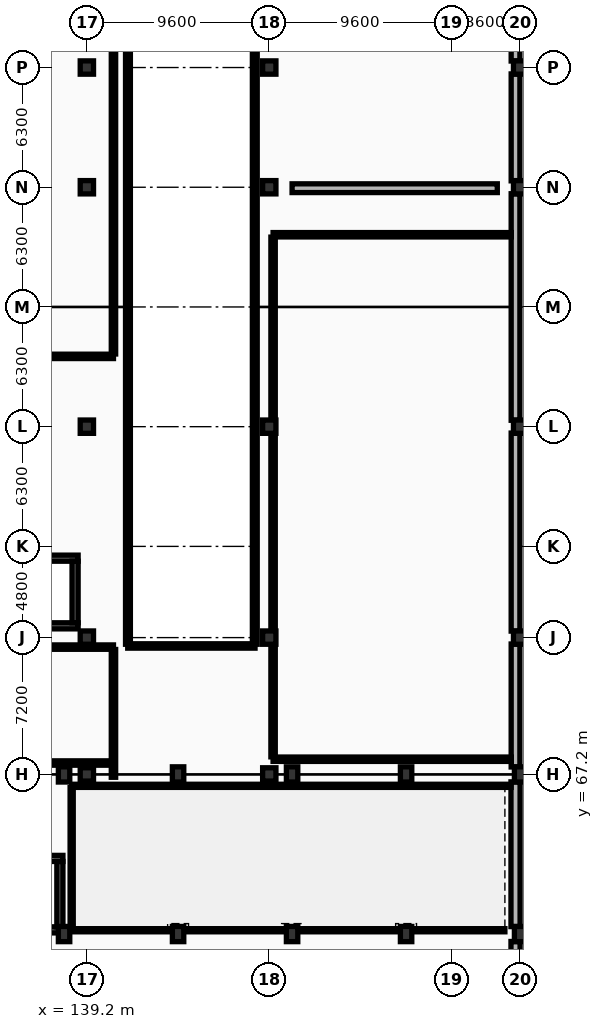
"""IFC4 building model, lengths in metres.
Left out: names, types, materials, properties, quantities, classifications, styles, units other than length and angle.
Written with IfcOpenShell. Run it as: python <this file> out.ifc"""

import sys

from ifc_helpers import new_model, si_unit, direction, frame, frame_2d, origin, origin_2d, place, context, subcontext, project, spatial, rectangle, extrude, element, fill, save


model = new_model("IFC4")
c1 = context("Model", 3, precision=1e-05, world=origin(), true_north=direction((0.0, 1.0)))
c2 = subcontext(c1, "Body", "Model", "MODEL_VIEW")
j1 = project(units=[si_unit("LENGTHUNIT", "METRE"), si_unit("PLANEANGLEUNIT", "RADIAN")], contexts=[c1])
p1 = place(None, origin())
s1 = spatial("IfcSite", under=j1, at=p1, CompositionType="ELEMENT")
p2 = place(p1, origin())
s2 = spatial("IfcBuilding", under=s1, at=p2, CompositionType="ELEMENT")
p3 = place(p2, origin())
s3 = spatial("IfcBuildingStorey", under=s2, at=p3, CompositionType="ELEMENT", Elevation=0.0)
for number, where, z_axis, x_axis in (
    (1, (138.0, 58.8, 0.0), (0.0, 0.0, 1.0), (1.0, 0.0, 0.0)),
    (2, (138.0, 67.2, 0.0), (0.0, 0.0, 1.0), (1.0, 0.0, 0.0)),
    (3, (144.0, 58.8, 0.0), (0.0, 0.0, 1.0), (1.0, 0.0, 0.0)),
    (4, (144.0, 67.2, 0.0), (0.0, 0.0, 1.0), (1.0, 0.0, 0.0)),
    (5, (150.0, 58.8, 0.0), (0.0, 0.0, 1.0), (1.0, 0.0, 0.0)),
    (6, (150.0, 67.2, 0.0), (0.0, 0.0, 1.0), (1.0, 0.0, 0.0)),
    (7, (156.0, 58.8, 0.0), (0.0, 0.0, 1.0), (1.0, 0.0, 0.0)),
    (8, (156.0, 67.2, 0.0), (0.0, 0.0, 1.0), (1.0, 0.0, 0.0)),
    (9, (162.0, 58.8, 0.0), (0.0, 0.0, 1.0), (1.0, 0.0, 0.0)),
    (10, (162.0, 67.2, 0.0), (0.0, 0.0, 1.0), (1.0, 0.0, 0.0)),
):
    element("IfcColumn", number, at=place(p3, frame(where, z_axis=z_axis, x_axis=x_axis)), inside=s3, PredefinedType="COLUMN", context=c2, shape_type="SweptSolid", body=[
        extrude(rectangle(XDim=0.6, YDim=0.8, at=origin_2d()), origin(), (0.0, 0.0, 1.0), 5.4),
    ])
for number, where, z_axis, x_axis in (
    (11, (139.2, 67.2, 0.0), (0.0, 0.0, 1.0), (1.0, 0.0, 0.0)),
    (12, (139.2, 74.4, 0.0), (0.0, 0.0, 1.0), (1.0, 0.0, 0.0)),
    (13, (139.2, 85.5, 0.0), (0.0, 0.0, 1.0), (1.0, 0.0, 0.0)),
    (14, (139.2, 98.1, 0.0), (0.0, 0.0, 1.0), (1.0, 0.0, 0.0)),
    (15, (139.2, 104.4, 0.0), (0.0, 0.0, 1.0), (1.0, 0.0, 0.0)),
    (16, (148.8, 67.2, 0.0), (0.0, 0.0, 1.0), (1.0, 0.0, 0.0)),
    (17, (148.8, 74.4, 0.0), (0.0, 0.0, 1.0), (1.0, 0.0, 0.0)),
    (18, (148.8, 85.5, 0.0), (0.0, 0.0, 1.0), (1.0, 0.0, 0.0)),
    (19, (148.8, 98.1, 0.0), (0.0, 0.0, 1.0), (1.0, 0.0, 0.0)),
    (20, (148.8, 104.4, 0.0), (0.0, 0.0, 1.0), (1.0, 0.0, 0.0)),
    (21, (162.0, 74.4, 0.0), (0.0, 0.0, 1.0), (1.0, 0.0, 0.0)),
    (22, (162.0, 85.5, 0.0), (0.0, 0.0, 1.0), (1.0, 0.0, 0.0)),
    (23, (162.0, 98.1, 0.0), (0.0, 0.0, 1.0), (1.0, 0.0, 0.0)),
    (24, (162.0, 104.4, 0.0), (0.0, 0.0, 1.0), (1.0, 0.0, 0.0)),
):
    element("IfcColumn", number, at=place(p3, frame(where, z_axis=z_axis, x_axis=x_axis)), inside=s3, PredefinedType="COLUMN", context=c2, shape_type="SweptSolid", body=[
        extrude(rectangle(XDim=0.7, YDim=0.7, at=origin_2d()), origin(), (0.0, 0.0, 1.0), 5.4),
    ])
p4 = place(p3, frame((161.76, 58.408, 0.0), z_axis=(0.0, 0.0, 1.0), x_axis=(0.0, -1.0, 0.0)))
e25 = element("IfcWall", 25, at=p4, inside=s3, PredefinedType="STANDARD", context=c2, shape_type="SweptSolid", body=[
    extrude(rectangle(XDim=20.816, YDim=0.48, at=frame_2d((10.408, 0.0))), origin(), (0.0, 0.0, 1.0), 4.17),
])
p5 = place(p4, frame((4.708, 0.0, 0.0)))
e26 = element("IfcOpeningElement", 26, at=p5, cuts=e25, PredefinedType="OPENING", context=c2, shape_type="SweptSolid", body=[
    extrude(rectangle(XDim=2.4, YDim=2.8, at=frame_2d((1.2, 1.4))), frame((0.0, 0.25, 0.0), z_axis=(0.0, -1.0, 0.0), x_axis=(1.0, 0.0, 0.0)), (0.0, 0.0, 1.0), 0.5),
])
p6 = place(p4, frame((10.308, 0.0, 0.0)))
e27 = element("IfcOpeningElement", 27, at=p6, cuts=e25, PredefinedType="OPENING", context=c2, shape_type="SweptSolid", body=[
    extrude(rectangle(XDim=2.4, YDim=2.8, at=frame_2d((1.2, 1.4))), frame((0.0, 0.25, 0.0), z_axis=(0.0, -1.0, 0.0), x_axis=(1.0, 0.0, 0.0)), (0.0, 0.0, 1.0), 0.5),
])
p7 = place(p4, frame((15.708, 0.0, 0.0)))
e28 = element("IfcOpeningElement", 28, at=p7, cuts=e25, PredefinedType="OPENING", context=c2, shape_type="SweptSolid", body=[
    extrude(rectangle(XDim=2.4, YDim=2.8, at=frame_2d((1.2, 1.4))), frame((0.0, 0.25, 0.0), z_axis=(0.0, -1.0, 0.0), x_axis=(1.0, 0.0, 0.0)), (0.0, 0.0, 1.0), 0.5),
])
p8 = place(p3, frame((161.76, 66.808, 0.0), z_axis=(0.0, 0.0, 1.0), x_axis=(0.0, -1.0, 0.0)))
e29 = element("IfcWall", 29, at=p8, inside=s3, PredefinedType="STANDARD", context=c2, shape_type="SweptSolid", body=[
    extrude(rectangle(XDim=7.616, YDim=0.48, at=frame_2d((3.808, 0.0))), origin(), (0.0, 0.0, 1.0), 4.17),
])
p9 = place(p8, frame((1.383, 0.0, 0.85)))
e30 = element("IfcOpeningElement", 30, at=p9, cuts=e29, PredefinedType="OPENING", context=c2, shape_type="SweptSolid", body=[
    extrude(rectangle(XDim=1.7, YDim=2.3, at=frame_2d((0.85, 1.15))), frame((0.0, 0.25, 0.0), z_axis=(0.0, -1.0, 0.0), x_axis=(1.0, 0.0, 0.0)), (0.0, 0.0, 1.0), 0.5),
])
p10 = place(p8, frame((4.533, 0.0, 0.85)))
e31 = element("IfcOpeningElement", 31, at=p10, cuts=e29, PredefinedType="OPENING", context=c2, shape_type="SweptSolid", body=[
    extrude(rectangle(XDim=1.7, YDim=2.3, at=frame_2d((0.85, 1.15))), frame((0.0, 0.25, 0.0), z_axis=(0.0, -1.0, 0.0), x_axis=(1.0, 0.0, 0.0)), (0.0, 0.0, 1.0), 0.5),
])
p11 = place(p3, frame((161.76, 74.063, 0.0), z_axis=(0.0, 0.0, 1.0), x_axis=(0.0, -1.0, 0.0)))
e32 = element("IfcWall", 32, at=p11, inside=s3, PredefinedType="STANDARD", context=c2, shape_type="SweptSolid", body=[
    extrude(rectangle(XDim=6.471, YDim=0.46, at=frame_2d((3.235, 0.0))), origin(), (0.0, 0.0, 1.0), 4.27),
])
p12 = place(p11, frame((1.553, 0.0, 2.15)))
e33 = element("IfcOpeningElement", 33, at=p12, cuts=e32, PredefinedType="OPENING", context=c2, shape_type="SweptSolid", body=[
    extrude(rectangle(XDim=0.85, YDim=0.9, at=frame_2d((0.425, 0.45))), frame((0.0, 0.24, 0.0), z_axis=(0.0, -1.0, 0.0), x_axis=(1.0, 0.0, 0.0)), (0.0, 0.0, 1.0), 0.48),
])
p13 = place(p11, frame((4.123, 0.0, 2.15)))
e34 = element("IfcOpeningElement", 34, at=p13, cuts=e32, PredefinedType="OPENING", context=c2, shape_type="SweptSolid", body=[
    extrude(rectangle(XDim=0.85, YDim=0.9, at=frame_2d((0.425, 0.45))), frame((0.0, 0.24, 0.0), z_axis=(0.0, -1.0, 0.0), x_axis=(1.0, 0.0, 0.0)), (0.0, 0.0, 1.0), 0.48),
])
p14 = place(p3, frame((161.76, 85.163, 0.0), z_axis=(0.0, 0.0, 1.0), x_axis=(0.0, -1.0, 0.0)))
e35 = element("IfcWall", 35, at=p14, inside=s3, PredefinedType="STANDARD", context=c2, shape_type="SweptSolid", body=[
    extrude(rectangle(XDim=10.421, YDim=0.46, at=frame_2d((5.21, 0.0))), origin(), (0.0, 0.0, 1.0), 4.27),
])
p15 = place(p14, frame((2.528, 0.0, 2.15)))
e36 = element("IfcOpeningElement", 36, at=p15, cuts=e35, PredefinedType="OPENING", context=c2, shape_type="SweptSolid", body=[
    extrude(rectangle(XDim=0.85, YDim=0.9, at=frame_2d((0.425, 0.45))), frame((0.0, 0.24, 0.0), z_axis=(0.0, -1.0, 0.0), x_axis=(1.0, 0.0, 0.0)), (0.0, 0.0, 1.0), 0.48),
])
p16 = place(p14, frame((7.048, 0.0, 2.15)))
e37 = element("IfcOpeningElement", 37, at=p16, cuts=e35, PredefinedType="OPENING", context=c2, shape_type="SweptSolid", body=[
    extrude(rectangle(XDim=0.85, YDim=0.9, at=frame_2d((0.425, 0.45))), frame((0.0, 0.24, 0.0), z_axis=(0.0, -1.0, 0.0), x_axis=(1.0, 0.0, 0.0)), (0.0, 0.0, 1.0), 0.48),
])
p17 = place(p3, frame((161.76, 97.758, 0.0), z_axis=(0.0, 0.0, 1.0), x_axis=(0.0, -1.0, 0.0)))
e38 = element("IfcWall", 38, at=p17, inside=s3, PredefinedType="STANDARD", context=c2, shape_type="SweptSolid", body=[
    extrude(rectangle(XDim=11.921, YDim=0.46, at=frame_2d((5.96, 0.0))), origin(), (0.0, 0.0, 1.0), 4.27),
])
p18 = place(p17, frame((9.558, 0.0, 0.0)))
e39 = element("IfcOpeningElement", 39, at=p18, cuts=e38, PredefinedType="OPENING", context=c2, shape_type="SweptSolid", body=[
    extrude(rectangle(XDim=1.8, YDim=2.25, at=frame_2d((0.9, 1.125))), frame((0.0, 0.24, 0.0), z_axis=(0.0, -1.0, 0.0), x_axis=(1.0, 0.0, 0.0)), (0.0, 0.0, 1.0), 0.48),
])
p19 = place(p3, frame((161.76, 104.063, 0.0), z_axis=(0.0, 0.0, 1.0), x_axis=(0.0, -1.0, 0.0)))
e40 = element("IfcWall", 40, at=p19, inside=s3, PredefinedType="STANDARD", context=c2, shape_type="SweptSolid", body=[
    extrude(rectangle(XDim=5.626, YDim=0.46, at=frame_2d((2.813, 0.0))), origin(), (0.0, 0.0, 1.0), 4.27),
])
p20 = place(p19, frame((0.713, 0.0, 0.0)))
e41 = element("IfcOpeningElement", 41, at=p20, cuts=e40, PredefinedType="OPENING", context=c2, shape_type="SweptSolid", body=[
    extrude(rectangle(XDim=4.2, YDim=3.6, at=frame_2d((2.1, 1.8))), frame((0.0, 0.24, 0.0), z_axis=(0.0, -1.0, 0.0), x_axis=(1.0, 0.0, 0.0)), (0.0, 0.0, 1.0), 0.48),
])
p21 = place(p3, frame((161.76, 112.32, 0.0), z_axis=(0.0, 0.0, 1.0), x_axis=(0.0, -1.0, 0.0)))
e42 = element("IfcWall", 42, at=p21, inside=s3, PredefinedType="STANDARD", context=c2, shape_type="SweptSolid", body=[
    extrude(rectangle(XDim=7.578, YDim=0.46, at=frame_2d((3.789, 0.0))), origin(), (0.0, 0.0, 1.0), 4.57),
])
p22 = place(p21, frame((1.71, 0.0, 2.15)))
e43 = element("IfcOpeningElement", 43, at=p22, cuts=e42, PredefinedType="OPENING", context=c2, shape_type="SweptSolid", body=[
    extrude(rectangle(XDim=0.85, YDim=0.9, at=frame_2d((0.425, 0.45))), frame((0.0, 0.24, 0.0), z_axis=(0.0, -1.0, 0.0), x_axis=(1.0, 0.0, 0.0)), (0.0, 0.0, 1.0), 0.48),
])
p23 = place(p21, frame((4.88, 0.0, 2.15)))
e44 = element("IfcOpeningElement", 44, at=p23, cuts=e42, PredefinedType="OPENING", context=c2, shape_type="SweptSolid", body=[
    extrude(rectangle(XDim=0.85, YDim=0.9, at=frame_2d((0.425, 0.45))), frame((0.0, 0.24, 0.0), z_axis=(0.0, -1.0, 0.0), x_axis=(1.0, 0.0, 0.0)), (0.0, 0.0, 1.0), 0.48),
])
p24 = place(p3, frame((150.0, 98.05, 0.0), z_axis=(0.0, 0.0, 1.0), x_axis=(1.0, 0.0, 0.0)))
e45 = element("IfcWall", 45, at=p24, inside=s3, PredefinedType="STANDARD", context=c2, shape_type="SweptSolid", body=[
    extrude(rectangle(XDim=10.8, YDim=0.46, at=frame_2d((5.4, 0.0))), origin(), (0.0, 0.0, 1.0), 4.1),
])
p25 = place(p24, frame((3.3, 0.0, 0.0)))
e46 = element("IfcOpeningElement", 46, at=p25, cuts=e45, PredefinedType="OPENING", context=c2, shape_type="SweptSolid", body=[
    extrude(rectangle(XDim=4.2, YDim=3.6, at=frame_2d((2.1, 1.8))), frame((0.0, 0.24, 0.0), z_axis=(0.0, -1.0, 0.0), x_axis=(1.0, 0.0, 0.0)), (0.0, 0.0, 1.0), 0.48),
])
for number, where, z_axis, x_axis in (
    (47, (129.86, 78.58, 0.0), (0.0, 0.0, 1.0), (1.0, 0.0, 0.0)),
    (48, (138.74, 75.02, 0.0), (0.0, 0.0, 1.0), (-1.0, 0.0, 0.0)),
):
    element("IfcWall", number, at=place(p3, frame(where, z_axis=z_axis, x_axis=x_axis)), inside=s3, PredefinedType="SHEAR", context=c2, shape_type="SweptSolid", body=[
        extrude(rectangle(XDim=8.88, YDim=0.32, at=frame_2d((4.44, 0.0))), origin(), (0.0, 0.0, 1.0), 5.14),
    ])
p26 = place(p3, frame((138.58, 78.42, 0.0), z_axis=(0.0, 0.0, 1.0), x_axis=(0.0, -1.0, 0.0)))
e49 = element("IfcWall", 49, at=p26, inside=s3, PredefinedType="SHEAR", context=c2, shape_type="SweptSolid", body=[
    extrude(rectangle(XDim=3.24, YDim=0.32, at=frame_2d((1.62, 0.0))), origin(), (0.0, 0.0, 1.0), 5.14),
])
for number, where, z_axis, x_axis in (
    (50, (128.66, 62.78, 0.0), (0.0, 0.0, 1.0), (1.0, 0.0, 0.0)),
    (51, (137.94, 59.02, 0.0), (0.0, 0.0, 1.0), (-1.0, 0.0, 0.0)),
):
    element("IfcWall", number, at=place(p3, frame(where, z_axis=z_axis, x_axis=x_axis)), inside=s3, PredefinedType="SHEAR", context=c2, shape_type="SweptSolid", body=[
        extrude(rectangle(XDim=9.28, YDim=0.32, at=frame_2d((4.64, 0.0))), origin(), (0.0, 0.0, 1.0), 5.14),
    ])
p27 = place(p3, frame((137.78, 62.62, 0.0), z_axis=(0.0, 0.0, 1.0), x_axis=(0.0, -1.0, 0.0)))
e52 = element("IfcWall", 52, at=p27, inside=s3, PredefinedType="SHEAR", context=c2, shape_type="SweptSolid", body=[
    extrude(rectangle(XDim=3.44, YDim=0.32, at=frame_2d((1.72, 0.0))), origin(), (0.0, 0.0, 1.0), 5.14),
])
for number, where, z_axis, x_axis in (
    (53, (141.35, 74.05, 0.0), (0.0, 0.0, 1.0), (0.0, 1.0, 0.0)),
    (54, (148.05, 112.2, 0.0), (0.0, 0.0, 1.0), (0.0, -1.0, 0.0)),
):
    element("IfcWall", number, at=place(p3, frame(where, z_axis=z_axis, x_axis=x_axis)), inside=s3, PredefinedType="STANDARD", context=c2, shape_type="SweptSolid", body=[
        extrude(rectangle(XDim=38.15, YDim=0.23, at=frame_2d((19.075, 0.0))), origin(), (0.0, 0.0, 1.0), 4.37),
    ])
p28 = place(p3, frame((148.05, 73.96, 0.0), z_axis=(0.0, 0.0, 1.0), x_axis=(-1.0, 0.0, 0.0)))
e55 = element("IfcWall", 55, at=p28, inside=s3, PredefinedType="STANDARD", context=c2, shape_type="SweptSolid", body=[
    extrude(rectangle(XDim=6.7, YDim=0.23, at=frame_2d((3.35, 0.0))), origin(), (0.0, 0.0, 1.0), 1.3),
])
p29 = place(p3, frame((138.4, 66.6, 0.0), z_axis=(0.0, 0.0, 1.0), x_axis=(1.0, 0.0, 0.0)))
e56 = element("IfcWall", 56, at=p29, inside=s3, PredefinedType="PARTITIONING", context=c2, shape_type="SweptSolid", body=[
    extrude(rectangle(XDim=23.126, YDim=0.165, at=frame_2d((11.563, 0.0))), origin(), (0.0, 0.0, 1.0), 4.62),
])
p30 = place(p3, frame((161.2, 59.0, 0.0), z_axis=(0.0, 0.0, 1.0), x_axis=(-1.0, 0.0, 0.0)))
e57 = element("IfcWall", 57, at=p30, inside=s3, PredefinedType="PARTITIONING", context=c2, shape_type="SweptSolid", body=[
    extrude(rectangle(XDim=22.8, YDim=0.165, at=frame_2d((11.4, 0.0))), origin(), (0.0, 0.0, 1.0), 4.17),
])
p31 = place(p30, frame((7.742, 0.0, 0.0)))
e58 = element("IfcOpeningElement", 58, at=p31, cuts=e57, PredefinedType="OPENING", context=c2, shape_type="SweptSolid", body=[
    extrude(rectangle(XDim=0.98, YDim=2.2, at=frame_2d((0.49, 1.1))), frame((0.0, 0.093, 0.0), z_axis=(0.0, -1.0, 0.0), x_axis=(1.0, 0.0, 0.0)), (0.0, 0.0, 1.0), 0.185),
])
p32 = place(p3, frame((138.4, 59.093, 0.0), z_axis=(0.0, 0.0, 1.0), x_axis=(0.0, 1.0, 0.0)))
e59 = element("IfcWall", 59, at=p32, inside=s3, PredefinedType="PARTITIONING", context=c2, shape_type="SweptSolid", body=[
    extrude(rectangle(XDim=7.415, YDim=0.165, at=frame_2d((3.708, 0.0))), origin(), (0.0, 0.0, 1.0), 4.17),
])
p33 = place(p3, frame((149.0, 95.6, 0.0), z_axis=(0.0, 0.0, 1.0), x_axis=(1.0, 0.0, 0.0)))
e60 = element("IfcWall", 60, at=p33, inside=s3, PredefinedType="STANDARD", context=c2, shape_type="SweptSolid", body=[
    extrude(rectangle(XDim=12.536, YDim=0.23, at=frame_2d((6.268, 0.0))), origin(), (0.0, 0.0, 1.0), 4.27),
])
p34 = place(p3, frame((161.536, 68.0, 0.0), z_axis=(0.0, 0.0, 1.0), x_axis=(-1.0, 0.0, 0.0)))
e61 = element("IfcWall", 61, at=p34, inside=s3, PredefinedType="STANDARD", context=c2, shape_type="SweptSolid", body=[
    extrude(rectangle(XDim=12.536, YDim=0.23, at=frame_2d((6.268, 0.0))), origin(), (0.0, 0.0, 1.0), 4.62),
])
p35 = place(p3, frame((149.0, 68.125, 0.0), z_axis=(0.0, 0.0, 1.0), x_axis=(0.0, 1.0, 0.0)))
e62 = element("IfcWall", 62, at=p35, inside=s3, PredefinedType="STANDARD", context=c2, shape_type="SweptSolid", body=[
    extrude(rectangle(XDim=27.35, YDim=0.23, at=frame_2d((13.675, 0.0))), origin(), (0.0, 0.0, 1.0), 4.27),
])
p36 = place(p35, frame((1.63, 0.0, 0.0)))
e63 = element("IfcOpeningElement", 63, at=p36, cuts=e62, PredefinedType="OPENING", context=c2, shape_type="SweptSolid", body=[
    extrude(rectangle(XDim=1.05, YDim=2.15, at=frame_2d((0.525, 1.075))), frame((0.0, 0.125, 0.0), z_axis=(0.0, -1.0, 0.0), x_axis=(1.0, 0.0, 0.0)), (0.0, 0.0, 1.0), 0.25),
])
p37 = place(p3, frame((120.6, 73.9, 0.0), z_axis=(0.0, 0.0, 1.0), x_axis=(1.0, 0.0, 0.0)))
e64 = element("IfcWall", 64, at=p37, inside=s3, PredefinedType="STANDARD", context=c2, shape_type="SweptSolid", body=[
    extrude(rectangle(XDim=20.0, YDim=0.23, at=frame_2d((10.0, 0.0))), origin(), (0.0, 0.0, 1.0), 4.62),
])
p38 = place(p37, frame((5.825, 0.0, 0.0)))
e65 = element("IfcOpeningElement", 65, at=p38, cuts=e64, PredefinedType="OPENING", context=c2, shape_type="SweptSolid", body=[
    extrude(rectangle(XDim=1.05, YDim=2.15, at=frame_2d((0.525, 1.075))), frame((0.0, 0.125, 0.0), z_axis=(0.0, -1.0, 0.0), x_axis=(1.0, 0.0, 0.0)), (0.0, 0.0, 1.0), 0.25),
])
p39 = place(p3, frame((140.6, 67.8, 0.0), z_axis=(0.0, 0.0, 1.0), x_axis=(-1.0, 0.0, 0.0)))
e66 = element("IfcWall", 66, at=p39, inside=s3, PredefinedType="STANDARD", context=c2, shape_type="SweptSolid", body=[
    extrude(rectangle(XDim=20.0, YDim=0.23, at=frame_2d((10.0, 0.0))), origin(), (0.0, 0.0, 1.0), 4.62),
])
p40 = place(p3, frame((140.6, 73.775, 0.0), z_axis=(0.0, 0.0, 1.0), x_axis=(0.0, -1.0, 0.0)))
e67 = element("IfcWall", 67, at=p40, inside=s3, PredefinedType="STANDARD", context=c2, shape_type="SweptSolid", body=[
    extrude(rectangle(XDim=6.725, YDim=0.23, at=frame_2d((3.362, 0.0))), origin(), (0.0, 0.0, 1.0), 4.47),
])
p41 = place(p3, frame((140.6, 89.2, 0.0), z_axis=(0.0, 0.0, 1.0), x_axis=(-1.0, 0.0, 0.0)))
e68 = element("IfcWall", 68, at=p41, inside=s3, PredefinedType="STANDARD", context=c2, shape_type="SweptSolid", body=[
    extrude(rectangle(XDim=20.0, YDim=0.23, at=frame_2d((10.0, 0.0))), origin(), (0.0, 0.0, 1.0), 4.27),
])
p42 = place(p41, frame((2.175, 0.0, 0.0)))
e69 = element("IfcOpeningElement", 69, at=p42, cuts=e68, PredefinedType="OPENING", context=c2, shape_type="SweptSolid", body=[
    extrude(rectangle(XDim=1.05, YDim=2.15, at=frame_2d((0.525, 1.075))), frame((0.0, 0.125, 0.0), z_axis=(0.0, -1.0, 0.0), x_axis=(1.0, 0.0, 0.0)), (0.0, 0.0, 1.0), 0.25),
])
p43 = place(p3, frame((140.6, 112.336, 0.0), z_axis=(0.0, 0.0, 1.0), x_axis=(0.0, -1.0, 0.0)))
e70 = element("IfcWall", 70, at=p43, inside=s3, PredefinedType="STANDARD", context=c2, shape_type="SweptSolid", body=[
    extrude(rectangle(XDim=23.011, YDim=0.23, at=frame_2d((11.505, 0.0))), origin(), (0.0, 0.0, 1.0), 4.37),
])
p44 = place(p9, origin())
e71 = element("IfcWindow", 71, at=p44, inside=s3, PartitioningType="SINGLE_PANEL", PredefinedType="WINDOW", context=c2, shape_type="SweptSolid", body=[
    extrude(rectangle(XDim=1.7, YDim=2.3, at=frame_2d((0.85, 1.15))), frame((0.0, 0.03, 0.0), z_axis=(0.0, -1.0, 0.0), x_axis=(1.0, 0.0, 0.0)), (0.0, 0.0, 1.0), 0.06),
])
fill(e30, e71)
p45 = place(p10, origin())
e72 = element("IfcWindow", 72, at=p45, inside=s3, PartitioningType="SINGLE_PANEL", PredefinedType="WINDOW", context=c2, shape_type="SweptSolid", body=[
    extrude(rectangle(XDim=1.7, YDim=2.3, at=frame_2d((0.85, 1.15))), frame((0.0, 0.03, 0.0), z_axis=(0.0, -1.0, 0.0), x_axis=(1.0, 0.0, 0.0)), (0.0, 0.0, 1.0), 0.06),
])
fill(e31, e72)
p46 = place(p12, origin())
e73 = element("IfcWindow", 73, at=p46, inside=s3, PartitioningType="SINGLE_PANEL", PredefinedType="WINDOW", context=c2, shape_type="SweptSolid", body=[
    extrude(rectangle(XDim=0.85, YDim=0.9, at=frame_2d((0.425, 0.45))), frame((0.0, 0.03, 0.0), z_axis=(0.0, -1.0, 0.0), x_axis=(1.0, 0.0, 0.0)), (0.0, 0.0, 1.0), 0.06),
])
fill(e33, e73)
p47 = place(p13, origin())
e74 = element("IfcWindow", 74, at=p47, inside=s3, PartitioningType="SINGLE_PANEL", PredefinedType="WINDOW", context=c2, shape_type="SweptSolid", body=[
    extrude(rectangle(XDim=0.85, YDim=0.9, at=frame_2d((0.425, 0.45))), frame((0.0, 0.03, 0.0), z_axis=(0.0, -1.0, 0.0), x_axis=(1.0, 0.0, 0.0)), (0.0, 0.0, 1.0), 0.06),
])
fill(e34, e74)
p48 = place(p15, origin())
e75 = element("IfcWindow", 75, at=p48, inside=s3, PartitioningType="SINGLE_PANEL", PredefinedType="WINDOW", context=c2, shape_type="SweptSolid", body=[
    extrude(rectangle(XDim=0.85, YDim=0.9, at=frame_2d((0.425, 0.45))), frame((0.0, 0.03, 0.0), z_axis=(0.0, -1.0, 0.0), x_axis=(1.0, 0.0, 0.0)), (0.0, 0.0, 1.0), 0.06),
])
fill(e36, e75)
p49 = place(p16, origin())
e76 = element("IfcWindow", 76, at=p49, inside=s3, PartitioningType="SINGLE_PANEL", PredefinedType="WINDOW", context=c2, shape_type="SweptSolid", body=[
    extrude(rectangle(XDim=0.85, YDim=0.9, at=frame_2d((0.425, 0.45))), frame((0.0, 0.03, 0.0), z_axis=(0.0, -1.0, 0.0), x_axis=(1.0, 0.0, 0.0)), (0.0, 0.0, 1.0), 0.06),
])
fill(e37, e76)
p50 = place(p18, origin())
e77 = element("IfcDoor", 77, at=p50, inside=s3, OperationType="DOUBLE_DOOR_SINGLE_SWING", PredefinedType="DOOR", context=c2, shape_type="SweptSolid", body=[
    extrude(rectangle(XDim=1.8, YDim=2.25, at=frame_2d((0.9, 1.125))), frame((0.0, 0.025, 0.0), z_axis=(0.0, -1.0, 0.0), x_axis=(1.0, 0.0, 0.0)), (0.0, 0.0, 1.0), 0.05),
])
fill(e39, e77)
p51 = place(p20, origin())
e78 = element("IfcDoor", 78, at=p51, inside=s3, OperationType="ROLLINGUP", PredefinedType="GATE", context=c2, shape_type="SweptSolid", body=[
    extrude(rectangle(XDim=4.2, YDim=3.6, at=frame_2d((2.1, 1.8))), frame((0.0, 0.025, 0.0), z_axis=(0.0, -1.0, 0.0), x_axis=(1.0, 0.0, 0.0)), (0.0, 0.0, 1.0), 0.05),
])
fill(e41, e78)
p52 = place(p25, origin())
e79 = element("IfcDoor", 79, at=p52, inside=s3, OperationType="ROLLINGUP", PredefinedType="GATE", context=c2, shape_type="SweptSolid", body=[
    extrude(rectangle(XDim=4.2, YDim=3.6, at=frame_2d((2.1, 1.8))), frame((0.0, 0.025, 0.0), z_axis=(0.0, -1.0, 0.0), x_axis=(1.0, 0.0, 0.0)), (0.0, 0.0, 1.0), 0.05),
])
fill(e46, e79)
p53 = place(p31, origin())
e80 = element("IfcDoor", 80, at=p53, inside=s3, OperationType="SINGLE_SWING_LEFT", PredefinedType="DOOR", context=c2, shape_type="SweptSolid", body=[
    extrude(rectangle(XDim=0.98, YDim=2.2, at=frame_2d((0.49, 1.1))), frame((0.0, 0.025, 0.0), z_axis=(0.0, -1.0, 0.0), x_axis=(1.0, 0.0, 0.0)), (0.0, 0.0, 1.0), 0.05),
])
fill(e58, e80)
p54 = place(p36, origin())
e81 = element("IfcDoor", 81, at=p54, inside=s3, OperationType="SINGLE_SWING_RIGHT", PredefinedType="DOOR", context=c2, shape_type="SweptSolid", body=[
    extrude(rectangle(XDim=1.05, YDim=2.15, at=frame_2d((0.525, 1.075))), frame((0.0, 0.025, 0.0), z_axis=(0.0, -1.0, 0.0), x_axis=(1.0, 0.0, 0.0)), (0.0, 0.0, 1.0), 0.05),
])
fill(e63, e81)
p55 = place(p42, origin())
e82 = element("IfcDoor", 82, at=p55, inside=s3, OperationType="SINGLE_SWING_RIGHT", PredefinedType="DOOR", context=c2, shape_type="SweptSolid", body=[
    extrude(rectangle(XDim=1.05, YDim=2.15, at=frame_2d((0.525, 1.075))), frame((0.0, 0.025, 0.0), z_axis=(0.0, -1.0, 0.0), x_axis=(1.0, 0.0, 0.0)), (0.0, 0.0, 1.0), 0.05),
])
fill(e69, e82)
save(model, sys.argv[1])
